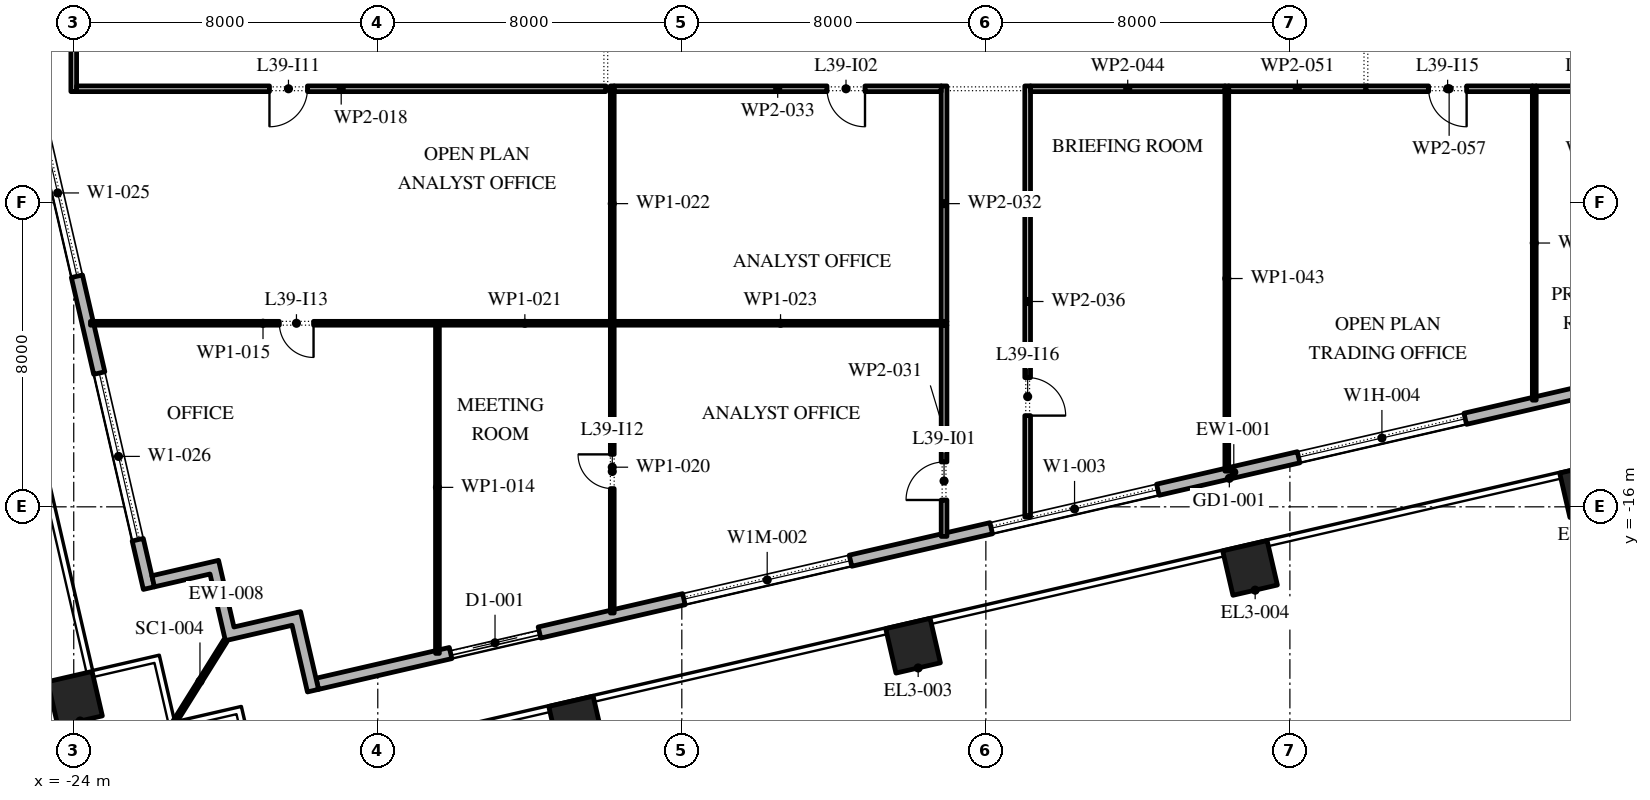
"""IFC4 building model, lengths in metres.
Left out: names, types, materials, properties, quantities, classifications, styles, units other than length and angle.
Written with IfcOpenShell. Run it as: python <this file> out.ifc"""

import sys

from ifc_helpers import new_model, si_unit, direction, frame, frame_2d, origin, origin_2d, place, context, subcontext, project, spatial, polyline, rectangle, outline, extrude, element, fill, save


model = new_model("IFC4")
c1 = context("Model", 3, precision=1e-05, world=origin(), true_north=direction((0.0, 1.0)))
c2 = subcontext(c1, "Body", "Model", "MODEL_VIEW")
j1 = project(units=[si_unit("LENGTHUNIT", "METRE"), si_unit("PLANEANGLEUNIT", "RADIAN")], contexts=[c1])
p1 = place(None, origin())
s1 = spatial("IfcSite", under=j1, at=p1, CompositionType="ELEMENT")
p2 = place(p1, origin())
s2 = spatial("IfcBuilding", under=s1, at=p2, CompositionType="ELEMENT")
p3 = place(p2, frame((0.0, 0.0, 180.0)))
s3 = spatial("IfcBuildingStorey", under=s2, at=p3, CompositionType="ELEMENT", Elevation=180.0)
for number, where, z_axis, x_axis in (
    (1, (-10.782, -21.702, 0.0), (0.0, 0.0, 1.0), (0.974, 0.225, 0.0)),
    (2, (-1.916, -19.655, 0.0), (0.0, 0.0, 1.0), (0.974, 0.225, 0.0)),
    (3, (6.951, -17.608, 0.0), (0.0, 0.0, 1.0), (0.974, 0.225, 0.0)),
    (4, (15.818, -15.561, 0.0), (0.0, 0.0, 1.0), (0.974, 0.225, 0.0)),
    (5, (-23.967, -21.051, 0.0), (0.0, 0.0, 1.0), (0.974, 0.225, 0.0)),
):
    element("IfcColumn", number, at=place(p3, frame(where, z_axis=z_axis, x_axis=x_axis)), inside=s3, PredefinedType="COLUMN", context=c2, shape_type="SweptSolid", body=[
        extrude(rectangle(XDim=1.2, YDim=1.2, at=origin_2d()), origin(), (0.0, 0.0, 1.0), 4.2),
    ])
p4 = place(p3, frame((-17.592, -20.657, 0.0), z_axis=(0.0, 0.0, 1.0), x_axis=(0.974370243697, 0.224950279389, 0.0)))
e6 = element("IfcWall", 6, at=p4, inside=s3, PredefinedType="STANDARD", context=c2, shape_type="SweptSolid", body=[
    extrude(rectangle(XDim=49.5, YDim=0.3, at=frame_2d((24.75, 0.0))), origin(), (0.0, 0.0, 1.0), 4.0),
])
p5 = place(p4, frame((3.6, 0.0, 0.0)))
e7 = element("IfcOpeningElement", 7, at=p5, cuts=e6, PredefinedType="OPENING", context=c2, shape_type="SweptSolid", body=[
    extrude(rectangle(XDim=2.4, YDim=3.5, at=frame_2d((1.2, 1.75))), frame((0.0, 0.16, 0.0), z_axis=(0.0, -1.0, 0.0), x_axis=(1.0, 0.0, 0.0)), (0.0, 0.0, 1.0), 0.32),
])
p6 = place(p4, frame((9.9, 0.0, 0.45)))
e8 = element("IfcOpeningElement", 8, at=p6, cuts=e6, PredefinedType="OPENING", context=c2, shape_type="SweptSolid", body=[
    extrude(rectangle(XDim=4.5, YDim=2.575, at=frame_2d((2.25, 1.288))), frame((0.0, 0.16, 0.0), z_axis=(0.0, -1.0, 0.0), x_axis=(1.0, 0.0, 0.0)), (0.0, 0.0, 1.0), 0.32),
])
p7 = place(p4, frame((18.2, 0.0, 0.45)))
e9 = element("IfcOpeningElement", 9, at=p7, cuts=e6, PredefinedType="OPENING", context=c2, shape_type="SweptSolid", body=[
    extrude(rectangle(XDim=4.5, YDim=3.05, at=frame_2d((2.25, 1.525))), frame((0.0, 0.16, 0.0), z_axis=(0.0, -1.0, 0.0), x_axis=(1.0, 0.0, 0.0)), (0.0, 0.0, 1.0), 0.32),
])
p8 = place(p4, frame((26.5, 0.0, 0.45)))
e10 = element("IfcOpeningElement", 10, at=p8, cuts=e6, PredefinedType="OPENING", context=c2, shape_type="SweptSolid", body=[
    extrude(rectangle(XDim=4.5, YDim=2.75, at=frame_2d((2.25, 1.375))), frame((0.0, 0.16, 0.0), z_axis=(0.0, -1.0, 0.0), x_axis=(1.0, 0.0, 0.0)), (0.0, 0.0, 1.0), 0.32),
])
p9 = place(p4, frame((36.8, 0.0, 0.0)))
e11 = element("IfcOpeningElement", 11, at=p9, cuts=e6, PredefinedType="OPENING", context=c2, shape_type="SweptSolid", body=[
    extrude(rectangle(XDim=2.4, YDim=3.275, at=frame_2d((1.2, 1.637))), frame((0.0, 0.16, 0.0), z_axis=(0.0, -1.0, 0.0), x_axis=(1.0, 0.0, 0.0)), (0.0, 0.0, 1.0), 0.32),
])
p10 = place(p4, frame((43.1, 0.0, 0.45)))
e12 = element("IfcOpeningElement", 12, at=p10, cuts=e6, PredefinedType="OPENING", context=c2, shape_type="SweptSolid", body=[
    extrude(rectangle(XDim=4.5, YDim=2.875, at=frame_2d((2.25, 1.438))), frame((0.0, 0.16, 0.0), z_axis=(0.0, -1.0, 0.0), x_axis=(1.0, 0.0, 0.0)), (0.0, 0.0, 1.0), 0.32),
])
p11 = place(p3, frame((-33.157, 30.092, 0.0), z_axis=(0.0, 0.0, 1.0), x_axis=(0.224950279389, -0.974370243697, 0.0)))
e13 = element("IfcWall", 13, at=p11, inside=s3, PredefinedType="STANDARD", context=c2, shape_type="SweptSolid", body=[
    extrude(rectangle(XDim=49.5, YDim=0.3, at=frame_2d((24.75, 0.0))), origin(), (0.0, 0.0, 1.0), 4.0),
])
p12 = place(p11, frame((2.207, 0.0, 0.0)))
e14 = element("IfcOpeningElement", 14, at=p12, cuts=e13, PredefinedType="OPENING", context=c2, shape_type="SweptSolid", body=[
    extrude(rectangle(XDim=2.4, YDim=3.5, at=frame_2d((1.2, 1.75))), frame((0.0, 0.16, 0.0), z_axis=(0.0, -1.0, 0.0), x_axis=(1.0, 0.0, 0.0)), (0.0, 0.0, 1.0), 0.32),
])
p13 = place(p11, frame((8.121, 0.0, 0.45)))
e15 = element("IfcOpeningElement", 15, at=p13, cuts=e13, PredefinedType="OPENING", context=c2, shape_type="SweptSolid", body=[
    extrude(rectangle(XDim=4.5, YDim=2.825, at=frame_2d((2.25, 1.413))), frame((0.0, 0.16, 0.0), z_axis=(0.0, -1.0, 0.0), x_axis=(1.0, 0.0, 0.0)), (0.0, 0.0, 1.0), 0.32),
])
p14 = place(p11, frame((15.236, 0.0, 0.45)))
e16 = element("IfcOpeningElement", 16, at=p14, cuts=e13, PredefinedType="OPENING", context=c2, shape_type="SweptSolid", body=[
    extrude(rectangle(XDim=4.5, YDim=2.95, at=frame_2d((2.25, 1.475))), frame((0.0, 0.16, 0.0), z_axis=(0.0, -1.0, 0.0), x_axis=(1.0, 0.0, 0.0)), (0.0, 0.0, 1.0), 0.32),
])
p15 = place(p11, frame((22.35, 0.0, 0.45)))
e17 = element("IfcOpeningElement", 17, at=p15, cuts=e13, PredefinedType="OPENING", context=c2, shape_type="SweptSolid", body=[
    extrude(rectangle(XDim=4.5, YDim=3.0, at=frame_2d((2.25, 1.5))), frame((0.0, 0.16, 0.0), z_axis=(0.0, -1.0, 0.0), x_axis=(1.0, 0.0, 0.0)), (0.0, 0.0, 1.0), 0.32),
])
p16 = place(p11, frame((30.514, 0.0, 0.0)))
e18 = element("IfcOpeningElement", 18, at=p16, cuts=e13, PredefinedType="OPENING", context=c2, shape_type="SweptSolid", body=[
    extrude(rectangle(XDim=2.4, YDim=3.5, at=frame_2d((1.2, 1.75))), frame((0.0, 0.16, 0.0), z_axis=(0.0, -1.0, 0.0), x_axis=(1.0, 0.0, 0.0)), (0.0, 0.0, 1.0), 0.32),
])
p17 = place(p11, frame((36.579, 0.0, 0.45)))
e19 = element("IfcOpeningElement", 19, at=p17, cuts=e13, PredefinedType="OPENING", context=c2, shape_type="SweptSolid", body=[
    extrude(rectangle(XDim=4.5, YDim=3.05, at=frame_2d((2.25, 1.525))), frame((0.0, 0.16, 0.0), z_axis=(0.0, -1.0, 0.0), x_axis=(1.0, 0.0, 0.0)), (0.0, 0.0, 1.0), 0.32),
])
p18 = place(p11, frame((43.693, 0.0, 0.45)))
e20 = element("IfcOpeningElement", 20, at=p18, cuts=e13, PredefinedType="OPENING", context=c2, shape_type="SweptSolid", body=[
    extrude(rectangle(XDim=4.5, YDim=3.05, at=frame_2d((2.25, 1.525))), frame((0.0, 0.16, 0.0), z_axis=(0.0, -1.0, 0.0), x_axis=(1.0, 0.0, 0.0)), (0.0, 0.0, 1.0), 0.32),
])
p19 = place(p3, origin())
e21 = element("IfcWall", 21, at=p19, inside=s3, PredefinedType="STANDARD", context=c2, shape_type="SweptSolid", body=[
    extrude(outline(polyline([(-18.256, -19.117), (-20.01, -19.522), (-20.414, -17.768), (-21.876, -18.105), (-21.943, -17.813), (-20.19, -17.408), (-19.785, -19.162), (-18.031, -18.757), (-17.558, -20.803), (-17.851, -20.871), (-18.256, -19.117)])), origin(), (0.0, 0.0, 1.0), 4.0),
])
p20 = place(p3, frame((-20.01, -19.522, -0.05), z_axis=(0.0, 0.0, 1.0), x_axis=(-0.529920736377, -0.848047176257, 0.0)))
e22 = element("IfcWall", 22, at=p20, inside=s3, PredefinedType="STANDARD", context=c2, shape_type="SweptSolid", body=[
    extrude(rectangle(XDim=2.526, YDim=0.1, at=frame_2d((1.263, 0.0))), origin(), (0.0, 0.0, 1.0), 4.05),
])
p21 = place(p3, frame((-24.0, -5.075, 0.0), z_axis=(0.0, 0.0, 1.0), x_axis=(0.0, 1.0, 0.0)))
e23 = element("IfcWall", 23, at=p21, inside=s3, PredefinedType="PARTITIONING", context=c2, shape_type="SweptSolid", body=[
    extrude(rectangle(XDim=7.815, YDim=0.15, at=frame_2d((3.907, 0.0))), origin(), (0.0, 0.0, 1.0), 4.0),
])
p22 = place(p3, frame((-14.43, -19.856, 0.0), z_axis=(0.0, 0.0, 1.0), x_axis=(0.0, 1.0, 0.0)))
e24 = element("IfcWall", 24, at=p22, inside=s3, PredefinedType="PARTITIONING", context=c2, shape_type="SweptSolid", body=[
    extrude(rectangle(XDim=8.736, YDim=0.1, at=frame_2d((4.368, 0.0))), origin(), (0.0, 0.0, 1.0), 4.0),
])
p23 = place(p3, frame((-14.48, -11.17, 0.0), z_axis=(0.0, 0.0, 1.0), x_axis=(-1.0, 0.0, 0.0)))
e25 = element("IfcWall", 25, at=p23, inside=s3, PredefinedType="PARTITIONING", context=c2, shape_type="SweptSolid", body=[
    extrude(rectangle(XDim=9.08, YDim=0.1, at=frame_2d((4.54, 0.0))), origin(), (0.0, 0.0, 1.0), 4.0),
])
p24 = place(p23, frame((3.21, 0.0, 0.0)))
e26 = element("IfcOpeningElement", 26, at=p24, cuts=e25, PredefinedType="OPENING", context=c2, shape_type="SweptSolid", body=[
    extrude(rectangle(XDim=0.9, YDim=2.1, at=frame_2d((0.45, 1.05))), frame((0.0, 0.06, 0.0), z_axis=(0.0, -1.0, 0.0), x_axis=(1.0, 0.0, 0.0)), (0.0, 0.0, 1.0), 0.12),
])
p25 = place(p3, frame((-10.0, -5.0, 0.0), z_axis=(0.0, 0.0, 1.0), x_axis=(-1.0, 0.0, 0.0)))
e27 = element("IfcWall", 27, at=p25, inside=s3, PredefinedType="PARTITIONING", context=c2, shape_type="SweptSolid", body=[
    extrude(rectangle(XDim=13.925, YDim=0.15, at=frame_2d((6.962, 0.0))), origin(), (0.0, 0.0, 1.0), 4.0),
])
p26 = place(p25, frame((7.85, 0.0, 0.0)))
e28 = element("IfcOpeningElement", 28, at=p26, cuts=e27, PredefinedType="OPENING", context=c2, shape_type="SweptSolid", body=[
    extrude(rectangle(XDim=1.0, YDim=2.1, at=frame_2d((0.5, 1.05))), frame((0.0, 0.085, 0.0), z_axis=(0.0, -1.0, 0.0), x_axis=(1.0, 0.0, 0.0)), (0.0, 0.0, 1.0), 0.17),
])
p27 = place(p3, frame((-9.83, -18.794, 0.0), z_axis=(0.0, 0.0, 1.0), x_axis=(0.0, 1.0, 0.0)))
e29 = element("IfcWall", 29, at=p27, inside=s3, PredefinedType="PARTITIONING", context=c2, shape_type="SweptSolid", body=[
    extrude(rectangle(XDim=7.674, YDim=0.1, at=frame_2d((3.837, 0.0))), origin(), (0.0, 0.0, 1.0), 4.0),
])
p28 = place(p27, frame((3.274, 0.0, 0.0)))
e30 = element("IfcOpeningElement", 30, at=p28, cuts=e29, PredefinedType="OPENING", context=c2, shape_type="SweptSolid", body=[
    extrude(rectangle(XDim=0.9, YDim=2.1, at=frame_2d((0.45, 1.05))), frame((0.0, 0.06, 0.0), z_axis=(0.0, -1.0, 0.0), x_axis=(1.0, 0.0, 0.0)), (0.0, 0.0, 1.0), 0.12),
])
p29 = place(p3, frame((-9.88, -11.17, 0.0), z_axis=(0.0, 0.0, 1.0), x_axis=(-1.0, 0.0, 0.0)))
e31 = element("IfcWall", 31, at=p29, inside=s3, PredefinedType="PARTITIONING", context=c2, shape_type="SweptSolid", body=[
    extrude(rectangle(XDim=4.5, YDim=0.1, at=frame_2d((2.25, 0.0))), origin(), (0.0, 0.0, 1.0), 4.0),
])
p30 = place(p3, frame((-9.83, -11.12, 0.0), z_axis=(0.0, 0.0, 1.0), x_axis=(0.0, 1.0, 0.0)))
e32 = element("IfcWall", 32, at=p30, inside=s3, PredefinedType="PARTITIONING", context=c2, shape_type="SweptSolid", body=[
    extrude(rectangle(XDim=6.195, YDim=0.1, at=frame_2d((3.098, 0.0))), origin(), (0.0, 0.0, 1.0), 4.0),
])
p31 = place(p3, frame((-9.78, -11.17, 0.0), z_axis=(0.0, 0.0, 1.0), x_axis=(1.0, 0.0, 0.0)))
e33 = element("IfcWall", 33, at=p31, inside=s3, PredefinedType="PARTITIONING", context=c2, shape_type="SweptSolid", body=[
    extrude(rectangle(XDim=8.755, YDim=0.1, at=frame_2d((4.377, 0.0))), origin(), (0.0, 0.0, 1.0), 4.0),
])
p32 = place(p3, frame((-1.1, -16.778, 0.0), z_axis=(0.0, 0.0, 1.0), x_axis=(0.0, 1.0, 0.0)))
e34 = element("IfcWall", 34, at=p32, inside=s3, PredefinedType="PARTITIONING", context=c2, shape_type="SweptSolid", body=[
    extrude(rectangle(XDim=5.558, YDim=0.15, at=frame_2d((2.779, 0.0))), origin(), (0.0, 0.0, 1.0), 4.0),
])
p33 = place(p32, frame((0.958, 0.0, 0.0)))
e35 = element("IfcOpeningElement", 35, at=p33, cuts=e34, PredefinedType="OPENING", context=c2, shape_type="SweptSolid", body=[
    extrude(rectangle(XDim=1.0, YDim=2.1, at=frame_2d((0.5, 1.05))), frame((0.0, 0.085, 0.0), z_axis=(0.0, -1.0, 0.0), x_axis=(1.0, 0.0, 0.0)), (0.0, 0.0, 1.0), 0.17),
])
p34 = place(p3, frame((-1.1, -11.12, 0.0), z_axis=(0.0, 0.0, 1.0), x_axis=(0.0, 1.0, 0.0)))
e36 = element("IfcWall", 36, at=p34, inside=s3, PredefinedType="PARTITIONING", context=c2, shape_type="SweptSolid", body=[
    extrude(rectangle(XDim=6.195, YDim=0.15, at=frame_2d((3.098, 0.0))), origin(), (0.0, 0.0, 1.0), 4.0),
])
p35 = place(p3, frame((-1.175, -5.0, 0.0), z_axis=(0.0, 0.0, 1.0), x_axis=(-1.0, 0.0, 0.0)))
e37 = element("IfcWall", 37, at=p35, inside=s3, PredefinedType="PARTITIONING", context=c2, shape_type="SweptSolid", body=[
    extrude(rectangle(XDim=8.605, YDim=0.15, at=frame_2d((4.302, 0.0))), origin(), (0.0, 0.0, 1.0), 4.0),
])
p36 = place(p35, frame((2.005, 0.0, 0.0)))
e38 = element("IfcOpeningElement", 38, at=p36, cuts=e37, PredefinedType="OPENING", context=c2, shape_type="SweptSolid", body=[
    extrude(rectangle(XDim=1.0, YDim=2.1, at=frame_2d((0.5, 1.05))), frame((0.0, 0.085, 0.0), z_axis=(0.0, -1.0, 0.0), x_axis=(1.0, 0.0, 0.0)), (0.0, 0.0, 1.0), 0.17),
])
p37 = place(p3, frame((1.1, -4.925, 0.0), z_axis=(0.0, 0.0, 1.0), x_axis=(0.0, -1.0, 0.0)))
e39 = element("IfcWall", 39, at=p37, inside=s3, PredefinedType="PARTITIONING", context=c2, shape_type="SweptSolid", body=[
    extrude(rectangle(XDim=11.345, YDim=0.15, at=frame_2d((5.672, 0.0))), origin(), (0.0, 0.0, 1.0), 4.0),
])
p38 = place(p37, frame((7.675, 0.0, 0.0)))
e40 = element("IfcOpeningElement", 40, at=p38, cuts=e39, PredefinedType="OPENING", context=c2, shape_type="SweptSolid", body=[
    extrude(rectangle(XDim=1.0, YDim=2.1, at=frame_2d((0.5, 1.05))), frame((0.0, 0.085, 0.0), z_axis=(0.0, -1.0, 0.0), x_axis=(1.0, 0.0, 0.0)), (0.0, 0.0, 1.0), 0.17),
])
p39 = place(p3, frame((6.34, -15.061, 0.0), z_axis=(0.0, 0.0, 1.0), x_axis=(0.0, 1.0, 0.0)))
e41 = element("IfcWall", 41, at=p39, inside=s3, PredefinedType="PARTITIONING", context=c2, shape_type="SweptSolid", body=[
    extrude(rectangle(XDim=10.136, YDim=0.1, at=frame_2d((5.068, 0.0))), origin(), (0.0, 0.0, 1.0), 4.0),
])
p40 = place(p3, frame((6.29, -5.0, 0.0), z_axis=(0.0, 0.0, 1.0), x_axis=(-1.0, 0.0, 0.0)))
e42 = element("IfcWall", 42, at=p40, inside=s3, PredefinedType="PARTITIONING", context=c2, shape_type="SweptSolid", body=[
    extrude(rectangle(XDim=5.115, YDim=0.15, at=frame_2d((2.558, 0.0))), origin(), (0.0, 0.0, 1.0), 4.0),
])
p41 = place(p3, frame((10.0, -5.0, 0.0), z_axis=(0.0, 0.0, 1.0), x_axis=(-1.0, 0.0, 0.0)))
e43 = element("IfcWall", 43, at=p41, inside=s3, PredefinedType="PARTITIONING", context=c2, shape_type="SweptSolid", body=[
    extrude(rectangle(XDim=3.61, YDim=0.15, at=frame_2d((1.805, 0.0))), origin(), (0.0, 0.0, 1.0), 4.0),
])
p42 = place(p3, frame((14.43, -13.193, 0.0), z_axis=(0.0, 0.0, 1.0), x_axis=(0.0, 1.0, 0.0)))
e44 = element("IfcWall", 44, at=p42, inside=s3, PredefinedType="PARTITIONING", context=c2, shape_type="SweptSolid", body=[
    extrude(rectangle(XDim=8.268, YDim=0.1, at=frame_2d((4.134, 0.0))), origin(), (0.0, 0.0, 1.0), 4.0),
])
p43 = place(p3, frame((14.38, -5.0, 0.0), z_axis=(0.0, 0.0, 1.0), x_axis=(-1.0, 0.0, 0.0)))
e45 = element("IfcWall", 45, at=p43, inside=s3, PredefinedType="PARTITIONING", context=c2, shape_type="SweptSolid", body=[
    extrude(rectangle(XDim=4.38, YDim=0.15, at=frame_2d((2.19, 0.0))), origin(), (0.0, 0.0, 1.0), 4.0),
])
p44 = place(p43, frame((1.73, 0.0, 0.0)))
e46 = element("IfcOpeningElement", 46, at=p44, cuts=e45, PredefinedType="OPENING", context=c2, shape_type="SweptSolid", body=[
    extrude(rectangle(XDim=1.0, YDim=2.1, at=frame_2d((0.5, 1.05))), frame((0.0, 0.085, 0.0), z_axis=(0.0, -1.0, 0.0), x_axis=(1.0, 0.0, 0.0)), (0.0, 0.0, 1.0), 0.17),
])
p45 = place(p3, frame((17.97, -5.0, 0.0), z_axis=(0.0, 0.0, 1.0), x_axis=(-1.0, 0.0, 0.0)))
e47 = element("IfcWall", 47, at=p45, inside=s3, PredefinedType="PARTITIONING", context=c2, shape_type="SweptSolid", body=[
    extrude(rectangle(XDim=3.49, YDim=0.15, at=frame_2d((1.745, 0.0))), origin(), (0.0, 0.0, 1.0), 4.0),
])
p46 = place(p45, frame((1.39, 0.0, 0.0)))
e48 = element("IfcOpeningElement", 48, at=p46, cuts=e47, PredefinedType="OPENING", context=c2, shape_type="SweptSolid", body=[
    extrude(rectangle(XDim=1.0, YDim=2.1, at=frame_2d((0.5, 1.05))), frame((0.0, 0.085, 0.0), z_axis=(0.0, -1.0, 0.0), x_axis=(1.0, 0.0, 0.0)), (0.0, 0.0, 1.0), 0.17),
])
p47 = place(p5, origin())
e49 = element("IfcDoor", 49, at=p47, inside=s3, OperationType="DOUBLE_DOOR_SLIDING", PredefinedType="DOOR", context=c2, shape_type="SweptSolid", body=[
    extrude(rectangle(XDim=2.4, YDim=3.5, at=frame_2d((1.2, 1.75))), frame((0.0, 0.025, 0.0), z_axis=(0.0, -1.0, 0.0), x_axis=(1.0, 0.0, 0.0)), (0.0, 0.0, 1.0), 0.05),
])
fill(e7, e49)
p48 = place(p6, origin())
e50 = element("IfcWindow", 50, at=p48, inside=s3, PartitioningType="DOUBLE_PANEL_VERTICAL", PredefinedType="WINDOW", context=c2, shape_type="SweptSolid", body=[
    extrude(rectangle(XDim=4.5, YDim=2.575, at=frame_2d((2.25, 1.288))), frame((0.0, 0.03, 0.0), z_axis=(0.0, -1.0, 0.0), x_axis=(1.0, 0.0, 0.0)), (0.0, 0.0, 1.0), 0.06),
])
fill(e8, e50)
p49 = place(p7, origin())
e51 = element("IfcWindow", 51, at=p49, inside=s3, PartitioningType="DOUBLE_PANEL_VERTICAL", PredefinedType="WINDOW", context=c2, shape_type="SweptSolid", body=[
    extrude(rectangle(XDim=4.5, YDim=3.05, at=frame_2d((2.25, 1.525))), frame((0.0, 0.03, 0.0), z_axis=(0.0, -1.0, 0.0), x_axis=(1.0, 0.0, 0.0)), (0.0, 0.0, 1.0), 0.06),
])
fill(e9, e51)
p50 = place(p8, origin())
e52 = element("IfcWindow", 52, at=p50, inside=s3, PartitioningType="DOUBLE_PANEL_VERTICAL", PredefinedType="WINDOW", context=c2, shape_type="SweptSolid", body=[
    extrude(rectangle(XDim=4.5, YDim=2.75, at=frame_2d((2.25, 1.375))), frame((0.0, 0.03, 0.0), z_axis=(0.0, -1.0, 0.0), x_axis=(1.0, 0.0, 0.0)), (0.0, 0.0, 1.0), 0.06),
])
fill(e10, e52)
p51 = place(p17, origin())
e53 = element("IfcWindow", 53, at=p51, inside=s3, PartitioningType="DOUBLE_PANEL_VERTICAL", PredefinedType="WINDOW", context=c2, shape_type="SweptSolid", body=[
    extrude(rectangle(XDim=4.5, YDim=3.05, at=frame_2d((2.25, 1.525))), frame((0.0, 0.03, 0.0), z_axis=(0.0, -1.0, 0.0), x_axis=(1.0, 0.0, 0.0)), (0.0, 0.0, 1.0), 0.06),
])
fill(e19, e53)
p52 = place(p18, origin())
e54 = element("IfcWindow", 54, at=p52, inside=s3, PartitioningType="DOUBLE_PANEL_VERTICAL", PredefinedType="WINDOW", context=c2, shape_type="SweptSolid", body=[
    extrude(rectangle(XDim=4.5, YDim=3.05, at=frame_2d((2.25, 1.525))), frame((0.0, 0.03, 0.0), z_axis=(0.0, -1.0, 0.0), x_axis=(1.0, 0.0, 0.0)), (0.0, 0.0, 1.0), 0.06),
])
fill(e20, e54)
p53 = place(p33, origin())
e55 = element("IfcDoor", 55, at=p53, inside=s3, OperationType="SINGLE_SWING_RIGHT", PredefinedType="DOOR", context=c2, shape_type="SweptSolid", body=[
    extrude(rectangle(XDim=1.0, YDim=2.1, at=frame_2d((0.5, 1.05))), frame((0.0, 0.025, 0.0), z_axis=(0.0, -1.0, 0.0), x_axis=(1.0, 0.0, 0.0)), (0.0, 0.0, 1.0), 0.05),
])
fill(e35, e55)
p54 = place(p36, origin())
e56 = element("IfcDoor", 56, at=p54, inside=s3, OperationType="SINGLE_SWING_RIGHT", PredefinedType="DOOR", context=c2, shape_type="SweptSolid", body=[
    extrude(rectangle(XDim=1.0, YDim=2.1, at=frame_2d((0.5, 1.05))), frame((0.0, 0.025, 0.0), z_axis=(0.0, -1.0, 0.0), x_axis=(1.0, 0.0, 0.0)), (0.0, 0.0, 1.0), 0.05),
])
fill(e38, e56)
p55 = place(p26, origin())
e57 = element("IfcDoor", 57, at=p55, inside=s3, OperationType="SINGLE_SWING_LEFT", PredefinedType="DOOR", context=c2, shape_type="SweptSolid", body=[
    extrude(rectangle(XDim=1.0, YDim=2.1, at=frame_2d((0.5, 1.05))), frame((0.0, 0.025, 0.0), z_axis=(0.0, -1.0, 0.0), x_axis=(1.0, 0.0, 0.0)), (0.0, 0.0, 1.0), 0.05),
])
fill(e28, e57)
p56 = place(p28, origin())
e58 = element("IfcDoor", 58, at=p56, inside=s3, OperationType="SINGLE_SWING_LEFT", PredefinedType="DOOR", context=c2, shape_type="SweptSolid", body=[
    extrude(rectangle(XDim=0.9, YDim=2.1, at=frame_2d((0.45, 1.05))), frame((0.0, 0.025, 0.0), z_axis=(0.0, -1.0, 0.0), x_axis=(1.0, 0.0, 0.0)), (0.0, 0.0, 1.0), 0.05),
])
fill(e30, e58)
p57 = place(p24, origin())
e59 = element("IfcDoor", 59, at=p57, inside=s3, OperationType="SINGLE_SWING_RIGHT", PredefinedType="DOOR", context=c2, shape_type="SweptSolid", body=[
    extrude(rectangle(XDim=0.9, YDim=2.1, at=frame_2d((0.45, 1.05))), frame((0.0, 0.025, 0.0), z_axis=(0.0, -1.0, 0.0), x_axis=(1.0, 0.0, 0.0)), (0.0, 0.0, 1.0), 0.05),
])
fill(e26, e59)
p58 = place(p44, origin())
e60 = element("IfcDoor", 60, at=p58, inside=s3, OperationType="SINGLE_SWING_RIGHT", PredefinedType="DOOR", context=c2, shape_type="SweptSolid", body=[
    extrude(rectangle(XDim=1.0, YDim=2.1, at=frame_2d((0.5, 1.05))), frame((0.0, 0.025, 0.0), z_axis=(0.0, -1.0, 0.0), x_axis=(1.0, 0.0, 0.0)), (0.0, 0.0, 1.0), 0.05),
])
fill(e46, e60)
p59 = place(p38, origin())
e61 = element("IfcDoor", 61, at=p59, inside=s3, OperationType="SINGLE_SWING_LEFT", PredefinedType="DOOR", context=c2, shape_type="SweptSolid", body=[
    extrude(rectangle(XDim=1.0, YDim=2.1, at=frame_2d((0.5, 1.05))), frame((0.0, 0.025, 0.0), z_axis=(0.0, -1.0, 0.0), x_axis=(1.0, 0.0, 0.0)), (0.0, 0.0, 1.0), 0.05),
])
fill(e40, e61)
save(model, sys.argv[1])
